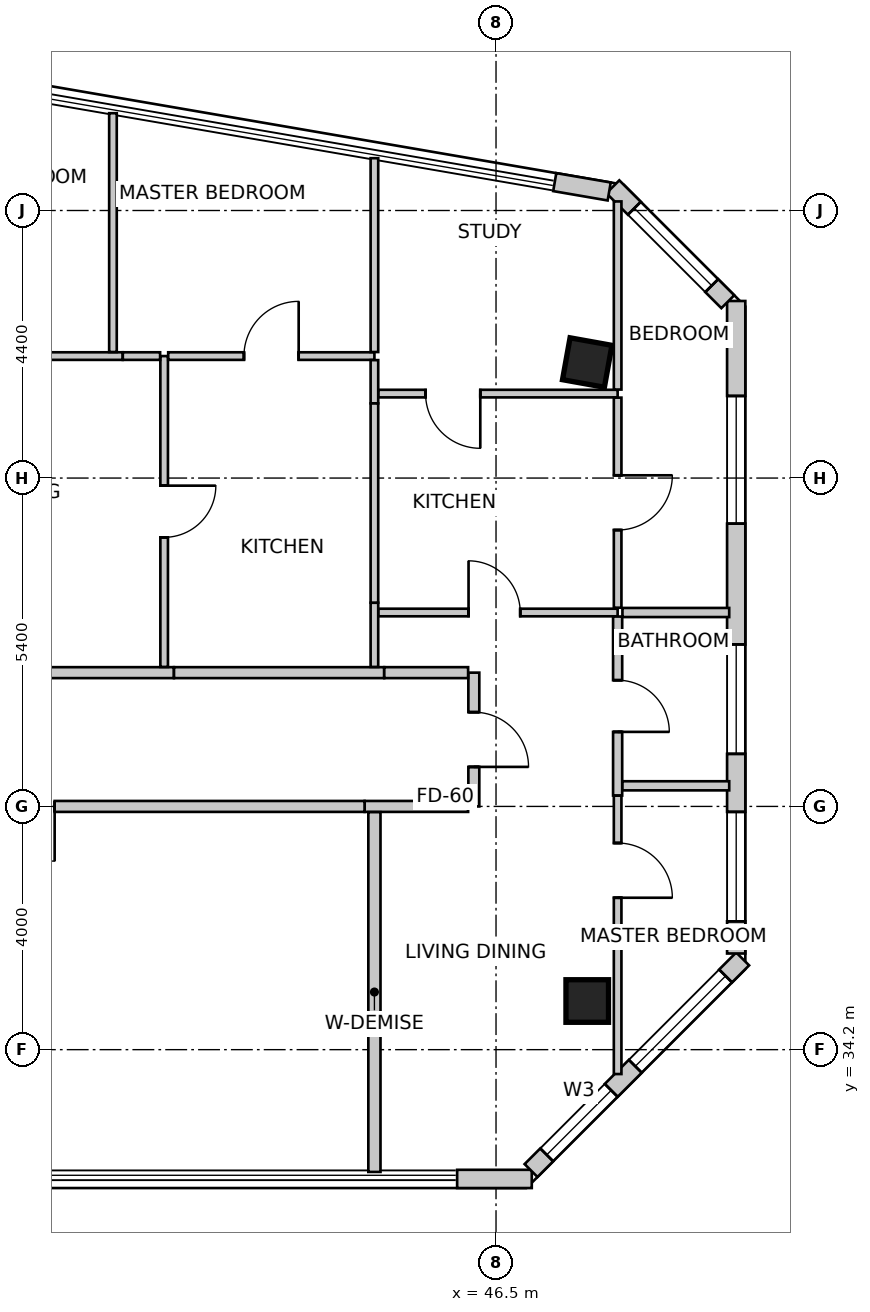
"""IFC4 building model, lengths in metres.
Left out: names, types, materials, properties, quantities, classifications, styles, units other than length and angle.
Written with IfcOpenShell. Run it as: python <this file> out.ifc"""

import sys

from ifc_helpers import new_model, si_unit, direction, frame, frame_2d, origin, origin_2d, place, context, subcontext, project, spatial, rectangle, extrude, source, transform, mapped, element, fill, save


model = new_model("IFC4")
c1 = context("Model", 3, precision=1e-05, world=origin(), true_north=direction((0.0, 1.0)))
c2 = subcontext(c1, "Body", "Model", "MODEL_VIEW")
j1 = project(units=[si_unit("LENGTHUNIT", "METRE"), si_unit("PLANEANGLEUNIT", "RADIAN")], contexts=[c1])
p1 = place(None, origin())
s1 = spatial("IfcSite", under=j1, at=p1, CompositionType="ELEMENT")
p2 = place(p1, origin())
s2 = spatial("IfcBuilding", under=s1, at=p2, CompositionType="ELEMENT")
p3 = place(p2, frame((0.0, 0.0, 197.4)))
s3 = spatial("IfcBuildingStorey", under=s2, at=p3, CompositionType="ELEMENT", Elevation=197.4)
m1 = source(origin(), c2, "Body", "SweptSolid", [
    extrude(rectangle(XDim=0.7, YDim=0.7, at=origin_2d()), origin(), (0.0, 0.0, 1.0), 3.5),
])
for number, where, z_axis, x_axis in (
    (1, (48.0, 45.5, 0.0), (0.0, 0.0, 1.0), (0.984, -0.177, 0.0)),
    (2, (48.0, 35.0, 0.0), (0.0, 0.0, 1.0), (1.0, 0.0, 0.0)),
):
    element("IfcColumn", number, at=place(p3, frame(where, z_axis=z_axis, x_axis=x_axis)), inside=s3, PredefinedType="COLUMN", context=c2, shape_type="MappedRepresentation", body=[
        mapped(m1, transform((0.0, 0.0, 0.0), scale=1.0)),
    ])
p4 = place(p3, frame((45.86, 32.074, 0.0), z_axis=(0.0, 0.0, 1.0), x_axis=(1.0, 0.0, 0.0)))
e3 = element("IfcWall", 3, at=p4, inside=s3, PredefinedType="SOLIDWALL", context=c2, shape_type="SweptSolid", body=[
    extrude(rectangle(XDim=1.228, YDim=0.3, at=frame_2d((0.614, 0.0))), origin(), (0.0, 0.0, 1.0), 3.25),
])
p5 = place(p3, frame((47.076, 32.212, 0.0), z_axis=(0.0, 0.0, 1.0), x_axis=(0.707106781187, 0.707106781187, 0.0)))
e4 = element("IfcWall", 4, at=p5, inside=s3, PredefinedType="SOLIDWALL", context=c2, shape_type="SweptSolid", body=[
    extrude(rectangle(XDim=4.922, YDim=0.3, at=frame_2d((2.461, 0.0))), origin(), (0.0, 0.0, 1.0), 3.25),
])
m2 = source(origin(), c2, "Body", "SweptSolid", [
    extrude(rectangle(XDim=1.5, YDim=1.8, at=frame_2d((0.75, 0.9))), frame((0.0, 0.16, 0.0), z_axis=(0.0, -1.0, 0.0), x_axis=(1.0, 0.0, 0.0)), (0.0, 0.0, 1.0), 0.32),
])
p6 = place(p5, frame((0.365, 0.0, 0.85)))
e5 = element("IfcOpeningElement", 5, at=p6, cuts=e4, PredefinedType="OPENING", context=c2, shape_type="MappedRepresentation", body=[
    mapped(m2, transform((0.0, 0.0, 0.0), scale=1.0)),
])
m3 = source(origin(), c2, "Body", "SweptSolid", [
    extrude(rectangle(XDim=2.1, YDim=2.0, at=frame_2d((1.05, 1.0))), frame((0.0, 0.16, 0.0), z_axis=(0.0, -1.0, 0.0), x_axis=(1.0, 0.0, 0.0)), (0.0, 0.0, 1.0), 0.32),
])
p7 = place(p5, frame((2.425, 0.0, 0.85)))
e6 = element("IfcOpeningElement", 6, at=p7, cuts=e4, PredefinedType="OPENING", context=c2, shape_type="MappedRepresentation", body=[
    mapped(m3, transform((0.0, 0.0, 0.0), scale=1.0)),
])
p8 = place(p3, frame((50.45, 35.781, 0.0), z_axis=(0.0, 0.0, 1.0), x_axis=(0.0, 1.0, 0.0)))
e7 = element("IfcWall", 7, at=p8, inside=s3, PredefinedType="SOLIDWALL", context=c2, shape_type="SweptSolid", body=[
    extrude(rectangle(XDim=10.731, YDim=0.3, at=frame_2d((5.365, 0.0))), origin(), (0.0, 0.0, 1.0), 3.25),
])
m4 = source(origin(), c2, "Body", "SweptSolid", [
    extrude(rectangle(XDim=1.8, YDim=2.1, at=frame_2d((0.9, 1.05))), frame((0.0, 0.16, 0.0), z_axis=(0.0, -1.0, 0.0), x_axis=(1.0, 0.0, 0.0)), (0.0, 0.0, 1.0), 0.32),
])
p9 = place(p8, frame((0.529, 0.0, 0.85)))
e8 = element("IfcOpeningElement", 8, at=p9, cuts=e7, PredefinedType="OPENING", context=c2, shape_type="MappedRepresentation", body=[
    mapped(m4, transform((0.0, 0.0, 0.0), scale=1.0)),
])
p10 = place(p8, frame((3.283, 0.0, 0.85)))
e9 = element("IfcOpeningElement", 9, at=p10, cuts=e7, PredefinedType="OPENING", context=c2, shape_type="MappedRepresentation", body=[
    mapped(m4, transform((0.0, 0.0, 0.0), scale=1.0)),
])
p11 = place(p8, frame((7.069, 0.0, 0.85)))
e10 = element("IfcOpeningElement", 10, at=p11, cuts=e7, PredefinedType="OPENING", context=c2, shape_type="MappedRepresentation", body=[
    mapped(m3, transform((0.0, 0.0, 0.0), scale=1.0)),
])
p12 = place(p3, frame((50.312, 46.5, 0.0), z_axis=(0.0, 0.0, 1.0), x_axis=(-0.707106781187, 0.707106781187, 0.0)))
e11 = element("IfcWall", 11, at=p12, inside=s3, PredefinedType="SOLIDWALL", context=c2, shape_type="SweptSolid", body=[
    extrude(rectangle(XDim=2.673, YDim=0.3, at=frame_2d((1.337, 0.0))), origin(), (0.0, 0.0, 1.0), 3.25),
])
p13 = place(p12, frame((0.374, 0.0, 0.85)))
e12 = element("IfcOpeningElement", 12, at=p13, cuts=e11, PredefinedType="OPENING", context=c2, shape_type="MappedRepresentation", body=[
    mapped(m4, transform((0.0, 0.0, 0.0), scale=1.0)),
])
p14 = place(p3, frame((48.361, 48.313, 0.0), z_axis=(0.0, 0.0, 1.0), x_axis=(-0.985560806516, 0.169321872949, 0.0)))
e13 = element("IfcWall", 13, at=p14, inside=s3, PredefinedType="SOLIDWALL", context=c2, shape_type="SweptSolid", body=[
    extrude(rectangle(XDim=0.908, YDim=0.3, at=frame_2d((0.454, 0.0))), origin(), (0.0, 0.0, 1.0), 3.25),
])
p15 = place(p3, frame((33.244, 40.4, 0.0), z_axis=(0.0, 0.0, 1.0), x_axis=(1.0, 0.0, 0.0)))
e14 = element("IfcWall", 14, at=p15, inside=s3, PredefinedType="PARTITIONING", context=c2, shape_type="SweptSolid", body=[
    extrude(rectangle(XDim=7.958, YDim=0.18, at=frame_2d((3.979, 0.0))), origin(), (0.0, 0.0, 1.0), 2.766),
])
m5 = source(origin(), c2, "Body", "SweptSolid", [
    extrude(rectangle(XDim=0.9, YDim=2.15, at=frame_2d((0.45, 1.075))), frame((0.0, 0.1, 0.0), z_axis=(0.0, -1.0, 0.0), x_axis=(1.0, 0.0, 0.0)), (0.0, 0.0, 1.0), 0.2),
])
p16 = place(p15, frame((2.807, 0.0, 0.0)))
e15 = element("IfcOpeningElement", 15, at=p16, cuts=e14, PredefinedType="OPENING", context=c2, shape_type="MappedRepresentation", body=[
    mapped(m5, transform((0.0, 0.0, 0.0), scale=1.0)),
])
p17 = place(p3, frame((41.204, 40.4, 0.0), z_axis=(0.0, 0.0, 1.0), x_axis=(1.0, 0.0, 0.0)))
e16 = element("IfcWall", 16, at=p17, inside=s3, PredefinedType="PARTITIONING", context=c2, shape_type="SweptSolid", body=[
    extrude(rectangle(XDim=3.456, YDim=0.18, at=frame_2d((1.728, 0.0))), origin(), (0.0, 0.0, 1.0), 2.779),
])
p18 = place(p3, frame((46.135, 40.4, 0.0), z_axis=(0.0, 0.0, 1.0), x_axis=(0.0, -1.0, 0.0)))
e17 = element("IfcWall", 17, at=p18, inside=s3, PredefinedType="PARTITIONING", context=c2, shape_type="SweptSolid", body=[
    extrude(rectangle(XDim=2.2, YDim=0.18, at=frame_2d((1.1, 0.0))), origin(), (0.0, 0.0, 1.0), 3.25),
])
p19 = place(p18, frame((0.65, 0.0, 0.0)))
e18 = element("IfcOpeningElement", 18, at=p19, cuts=e17, PredefinedType="OPENING", context=c2, shape_type="MappedRepresentation", body=[
    mapped(m5, transform((0.0, 0.0, 0.0), scale=1.0)),
])
p20 = place(p3, frame((44.662, 40.4, 0.0), z_axis=(0.0, 0.0, 1.0), x_axis=(1.0, 0.0, 0.0)))
e19 = element("IfcWall", 19, at=p20, inside=s3, PredefinedType="PARTITIONING", context=c2, shape_type="SweptSolid", body=[
    extrude(rectangle(XDim=1.379, YDim=0.18, at=frame_2d((0.689, 0.0))), origin(), (0.0, 0.0, 1.0), 3.25),
])
p21 = place(p3, frame((46.041, 38.2, 0.0), z_axis=(0.0, 0.0, 1.0), x_axis=(-1.0, 0.0, 0.0)))
e20 = element("IfcWall", 20, at=p21, inside=s3, PredefinedType="PARTITIONING", context=c2, shape_type="SweptSolid", body=[
    extrude(rectangle(XDim=1.701, YDim=0.18, at=frame_2d((0.851, 0.0))), origin(), (0.0, 0.0, 1.0), 2.919),
])
p22 = place(p3, frame((44.338, 38.2, 0.0), z_axis=(0.0, 0.0, 1.0), x_axis=(-1.0, 0.0, 0.0)))
e21 = element("IfcWall", 21, at=p22, inside=s3, PredefinedType="PARTITIONING", context=c2, shape_type="SweptSolid", body=[
    extrude(rectangle(XDim=11.094, YDim=0.18, at=frame_2d((5.547, 0.0))), origin(), (0.0, 0.0, 1.0), 2.766),
])
p23 = place(p22, frame((5.097, 0.0, 0.0)))
e22 = element("IfcOpeningElement", 22, at=p23, cuts=e21, PredefinedType="OPENING", context=c2, shape_type="MappedRepresentation", body=[
    mapped(m5, transform((0.0, 0.0, 0.0), scale=1.0)),
])
p24 = place(p3, frame((41.042, 45.606, 0.0), z_axis=(0.0, 0.0, 1.0), x_axis=(0.0, -1.0, 0.0)))
e23 = element("IfcWall", 23, at=p24, inside=s3, PredefinedType="PARTITIONING", context=c2, shape_type="SweptSolid", body=[
    extrude(rectangle(XDim=5.112, YDim=0.125, at=frame_2d((2.556, 0.0))), origin(), (0.0, 0.0, 1.0), 2.779),
])
m6 = source(origin(), c2, "Body", "SweptSolid", [
    extrude(rectangle(XDim=0.85, YDim=2.15, at=frame_2d((0.425, 1.075))), frame((0.0, 0.073, 0.0), z_axis=(0.0, -1.0, 0.0), x_axis=(1.0, 0.0, 0.0)), (0.0, 0.0, 1.0), 0.145),
])
p25 = place(p24, frame((2.131, 0.0, 0.0)))
e24 = element("IfcOpeningElement", 24, at=p25, cuts=e23, PredefinedType="OPENING", context=c2, shape_type="MappedRepresentation", body=[
    mapped(m6, transform((0.0, 0.0, 0.0), scale=1.0)),
])
p26 = place(p3, frame((36.062, 45.606, 0.0), z_axis=(0.0, 0.0, 1.0), x_axis=(1.0, 0.0, 0.0)))
e25 = element("IfcWall", 25, at=p26, inside=s3, PredefinedType="PARTITIONING", context=c2, shape_type="SweptSolid", body=[
    extrude(rectangle(XDim=4.298, YDim=0.125, at=frame_2d((2.149, 0.0))), origin(), (0.0, 0.0, 1.0), 2.766),
])
m7 = source(origin(), c2, "Body", "SweptSolid", [
    extrude(rectangle(XDim=0.9, YDim=2.15, at=frame_2d((0.45, 1.075))), frame((0.0, 0.073, 0.0), z_axis=(0.0, -1.0, 0.0), x_axis=(1.0, 0.0, 0.0)), (0.0, 0.0, 1.0), 0.145),
])
p27 = place(p26, frame((0.403, 0.0, 0.0)))
e26 = element("IfcOpeningElement", 26, at=p27, cuts=e25, PredefinedType="OPENING", context=c2, shape_type="MappedRepresentation", body=[
    mapped(m7, transform((0.0, 0.0, 0.0), scale=1.0)),
])
p28 = place(p3, frame((40.362, 45.606, 0.0), z_axis=(0.0, 0.0, 1.0), x_axis=(1.0, 0.0, 0.0)))
e27 = element("IfcWall", 27, at=p28, inside=s3, PredefinedType="PARTITIONING", context=c2, shape_type="SweptSolid", body=[
    extrude(rectangle(XDim=0.614, YDim=0.125, at=frame_2d((0.307, 0.0))), origin(), (0.0, 0.0, 1.0), 3.25),
])
p29 = place(p3, frame((41.108, 45.606, 0.0), z_axis=(0.0, 0.0, 1.0), x_axis=(1.0, 0.0, 0.0)))
e28 = element("IfcWall", 28, at=p29, inside=s3, PredefinedType="PARTITIONING", context=c2, shape_type="SweptSolid", body=[
    extrude(rectangle(XDim=3.392, YDim=0.125, at=frame_2d((1.696, 0.0))), origin(), (0.0, 0.0, 1.0), 3.25),
])
p30 = place(p29, frame((1.246, 0.0, 0.0)))
e29 = element("IfcOpeningElement", 29, at=p30, cuts=e28, PredefinedType="OPENING", context=c2, shape_type="MappedRepresentation", body=[
    mapped(m7, transform((0.0, 0.0, 0.0), scale=1.0)),
])
p31 = place(p3, frame((44.5, 45.54, 0.0), z_axis=(0.0, 0.0, 1.0), x_axis=(0.0, -1.0, 0.0)))
e30 = element("IfcWall", 30, at=p31, inside=s3, PredefinedType="PARTITIONING", context=c2, shape_type="SweptSolid", body=[
    extrude(rectangle(XDim=0.71, YDim=0.125, at=frame_2d((0.355, 0.0))), origin(), (0.0, 0.0, 1.0), 3.25),
])
p32 = place(p3, frame((44.5, 41.549, 0.0), z_axis=(0.0, 0.0, 1.0), x_axis=(0.0, -1.0, 0.0)))
e31 = element("IfcWall", 31, at=p32, inside=s3, PredefinedType="PARTITIONING", context=c2, shape_type="SweptSolid", body=[
    extrude(rectangle(XDim=1.055, YDim=0.125, at=frame_2d((0.528, 0.0))), origin(), (0.0, 0.0, 1.0), 2.779),
])
p33 = place(p3, frame((44.5, 44.827, 0.0), z_axis=(0.0, 0.0, 1.0), x_axis=(0.0, -1.0, 0.0)))
e32 = element("IfcWall", 32, at=p33, inside=s3, PredefinedType="PARTITIONING", context=c2, shape_type="SweptSolid", body=[
    extrude(rectangle(XDim=3.276, YDim=0.125, at=frame_2d((1.638, 0.0))), origin(), (0.0, 0.0, 1.0), 2.779),
])
p34 = place(p3, frame((40.2, 49.6, 0.0), z_axis=(0.0, 0.0, 1.0), x_axis=(0.0, -1.0, 0.0)))
e33 = element("IfcWall", 33, at=p34, inside=s3, PredefinedType="PARTITIONING", context=c2, shape_type="SweptSolid", body=[
    extrude(rectangle(XDim=3.927, YDim=0.125, at=frame_2d((1.964, 0.0))), origin(), (0.0, 0.0, 1.0), 2.542),
])
p35 = place(p3, frame((44.5, 48.86, 0.0), z_axis=(0.0, 0.0, 1.0), x_axis=(0.0, -1.0, 0.0)))
e34 = element("IfcWall", 34, at=p35, inside=s3, PredefinedType="PARTITIONING", context=c2, shape_type="SweptSolid", body=[
    extrude(rectangle(XDim=3.188, YDim=0.125, at=frame_2d((1.594, 0.0))), origin(), (0.0, 0.0, 1.0), 2.542),
])
p36 = place(p3, frame((48.5, 44.989, 0.0), z_axis=(0.0, 0.0, 1.0), x_axis=(-1.0, 0.0, 0.0)))
e35 = element("IfcWall", 35, at=p36, inside=s3, PredefinedType="PARTITIONING", context=c2, shape_type="SweptSolid", body=[
    extrude(rectangle(XDim=3.934, YDim=0.125, at=frame_2d((1.967, 0.0))), origin(), (0.0, 0.0, 1.0), 2.766),
])
p37 = place(p36, frame((2.259, 0.0, 0.0)))
e36 = element("IfcOpeningElement", 36, at=p37, cuts=e35, PredefinedType="OPENING", context=c2, shape_type="MappedRepresentation", body=[
    mapped(m7, transform((0.0, 0.0, 0.0), scale=1.0)),
])
p38 = place(p3, frame((48.5, 48.149, 0.0), z_axis=(0.0, 0.0, 1.0), x_axis=(0.0, -1.0, 0.0)))
e37 = element("IfcWall", 37, at=p38, inside=s3, PredefinedType="PARTITIONING", context=c2, shape_type="SweptSolid", body=[
    extrude(rectangle(XDim=3.094, YDim=0.125, at=frame_2d((1.547, 0.0))), origin(), (0.0, 0.0, 1.0), 3.25),
])
p39 = place(p3, frame((44.566, 41.389, 0.0), z_axis=(0.0, 0.0, 1.0), x_axis=(1.0, 0.0, 0.0)))
e38 = element("IfcWall", 38, at=p39, inside=s3, PredefinedType="PARTITIONING", context=c2, shape_type="SweptSolid", body=[
    extrude(rectangle(XDim=3.934, YDim=0.125, at=frame_2d((1.967, 0.0))), origin(), (0.0, 0.0, 1.0), 2.766),
])
p40 = place(p39, frame((1.482, 0.0, 0.0)))
e39 = element("IfcOpeningElement", 39, at=p40, cuts=e38, PredefinedType="OPENING", context=c2, shape_type="MappedRepresentation", body=[
    mapped(m6, transform((0.0, 0.0, 0.0), scale=1.0)),
])
p41 = place(p3, frame((48.5, 41.323, 0.0), z_axis=(0.0, 0.0, 1.0), x_axis=(0.0, -1.0, 0.0)))
e40 = element("IfcWall", 40, at=p41, inside=s3, PredefinedType="PARTITIONING", context=c2, shape_type="SweptSolid", body=[
    extrude(rectangle(XDim=2.944, YDim=0.15, at=frame_2d((1.472, 0.0))), origin(), (0.0, 0.0, 1.0), 3.25),
])
m8 = source(origin(), c2, "Body", "SweptSolid", [
    extrude(rectangle(XDim=0.85, YDim=2.15, at=frame_2d((0.425, 1.075))), frame((0.0, 0.085, 0.0), z_axis=(0.0, -1.0, 0.0), x_axis=(1.0, 0.0, 0.0)), (0.0, 0.0, 1.0), 0.17),
])
p42 = place(p41, frame((1.047, 0.0, 0.0)))
e41 = element("IfcOpeningElement", 41, at=p42, cuts=e40, PredefinedType="OPENING", context=c2, shape_type="MappedRepresentation", body=[
    mapped(m8, transform((0.0, 0.0, 0.0), scale=1.0)),
])
p43 = place(p3, frame((48.5, 38.377, 0.0), z_axis=(0.0, 0.0, 1.0), x_axis=(0.0, -1.0, 0.0)))
e42 = element("IfcWall", 42, at=p43, inside=s3, PredefinedType="PARTITIONING", context=c2, shape_type="SweptSolid", body=[
    extrude(rectangle(XDim=4.578, YDim=0.125, at=frame_2d((2.289, 0.0))), origin(), (0.0, 0.0, 1.0), 3.25),
])
p44 = place(p43, frame((0.779, 0.0, 0.0)))
e43 = element("IfcOpeningElement", 43, at=p44, cuts=e42, PredefinedType="OPENING", context=c2, shape_type="MappedRepresentation", body=[
    mapped(m7, transform((0.0, 0.0, 0.0), scale=1.0)),
])
p45 = place(p3, frame((44.5, 32.189, 0.0), z_axis=(0.0, 0.0, 1.0), x_axis=(0.0, 1.0, 0.0)))
e44 = element("IfcWall", 44, at=p45, inside=s3, PredefinedType="PARTITIONING", context=c2, shape_type="SweptSolid", body=[
    extrude(rectangle(XDim=5.917, YDim=0.2, at=frame_2d((2.958, 0.0))), origin(), (0.0, 0.0, 1.0), 2.542),
])
p46 = place(p3, frame((48.5, 44.923, 0.0), z_axis=(0.0, 0.0, 1.0), x_axis=(0.0, -1.0, 0.0)))
e45 = element("IfcWall", 45, at=p46, inside=s3, PredefinedType="PARTITIONING", context=c2, shape_type="SweptSolid", body=[
    extrude(rectangle(XDim=3.455, YDim=0.125, at=frame_2d((1.727, 0.0))), origin(), (0.0, 0.0, 1.0), 3.25),
])
p47 = place(p46, frame((1.277, 0.0, 0.0)))
e46 = element("IfcOpeningElement", 46, at=p47, cuts=e45, PredefinedType="OPENING", context=c2, shape_type="MappedRepresentation", body=[
    mapped(m7, transform((0.0, 0.0, 0.0), scale=1.0)),
])
for number, where, z_axis, x_axis in (
    (47, (48.579, 41.389, 0.0), (0.0, 0.0, 1.0), (1.0, 0.0, 0.0)),
    (48, (50.335, 38.539, 0.0), (0.0, 0.0, 1.0), (-1.0, 0.0, 0.0)),
):
    element("IfcWall", number, at=place(p3, frame(where, z_axis=z_axis, x_axis=x_axis)), inside=s3, PredefinedType="PARTITIONING", context=c2, shape_type="SweptSolid", body=[
        extrude(rectangle(XDim=1.756, YDim=0.15, at=frame_2d((0.878, 0.0))), origin(), (0.0, 0.0, 1.0), 3.25),
    ])
m9 = source(origin(), c2, "Body", "SweptSolid", [
    extrude(rectangle(XDim=1.5, YDim=1.8, at=frame_2d((0.75, 0.9))), frame((0.0, -0.015, 0.0), z_axis=(0.0, -1.0, 0.0), x_axis=(1.0, 0.0, 0.0)), (0.0, 0.0, 1.0), 0.06),
])
p48 = place(p6, origin())
e49 = element("IfcWindow", 49, at=p48, inside=s3, PartitioningType="SINGLE_PANEL", PredefinedType="WINDOW", context=c2, shape_type="MappedRepresentation", body=[
    mapped(m9, transform((0.0, 0.0, 0.0), scale=1.0)),
])
fill(e5, e49)
m10 = source(origin(), c2, "Body", "SweptSolid", [
    extrude(rectangle(XDim=2.1, YDim=2.0, at=frame_2d((1.05, 1.0))), frame((0.0, -0.015, 0.0), z_axis=(0.0, -1.0, 0.0), x_axis=(1.0, 0.0, 0.0)), (0.0, 0.0, 1.0), 0.06),
])
p49 = place(p7, origin())
e50 = element("IfcWindow", 50, at=p49, inside=s3, PartitioningType="SINGLE_PANEL", PredefinedType="WINDOW", context=c2, shape_type="MappedRepresentation", body=[
    mapped(m10, transform((0.0, 0.0, 0.0), scale=1.0)),
])
fill(e6, e50)
m11 = source(origin(), c2, "Body", "SweptSolid", [
    extrude(rectangle(XDim=1.8, YDim=2.1, at=frame_2d((0.9, 1.05))), frame((0.0, -0.015, 0.0), z_axis=(0.0, -1.0, 0.0), x_axis=(1.0, 0.0, 0.0)), (0.0, 0.0, 1.0), 0.06),
])
p50 = place(p9, origin())
e51 = element("IfcWindow", 51, at=p50, inside=s3, PartitioningType="SINGLE_PANEL", PredefinedType="WINDOW", context=c2, shape_type="MappedRepresentation", body=[
    mapped(m11, transform((0.0, 0.0, 0.0), scale=1.0)),
])
fill(e8, e51)
p51 = place(p10, origin())
e52 = element("IfcWindow", 52, at=p51, inside=s3, PartitioningType="SINGLE_PANEL", PredefinedType="WINDOW", context=c2, shape_type="MappedRepresentation", body=[
    mapped(m11, transform((0.0, 0.0, 0.0), scale=1.0)),
])
fill(e9, e52)
p52 = place(p11, origin())
e53 = element("IfcWindow", 53, at=p52, inside=s3, PartitioningType="SINGLE_PANEL", PredefinedType="WINDOW", context=c2, shape_type="MappedRepresentation", body=[
    mapped(m10, transform((0.0, 0.0, 0.0), scale=1.0)),
])
fill(e10, e53)
p53 = place(p13, origin())
e54 = element("IfcWindow", 54, at=p53, inside=s3, PartitioningType="SINGLE_PANEL", PredefinedType="WINDOW", context=c2, shape_type="MappedRepresentation", body=[
    mapped(m11, transform((0.0, 0.0, 0.0), scale=1.0)),
])
fill(e12, e54)
m12 = source(origin(), c2, "Body", "SweptSolid", [
    extrude(rectangle(XDim=0.85, YDim=2.15, at=frame_2d((0.425, 1.075))), frame((0.0, 0.025, 0.0), z_axis=(0.0, -1.0, 0.0), x_axis=(1.0, 0.0, 0.0)), (0.0, 0.0, 1.0), 0.05),
])
p54 = place(p25, origin())
e55 = element("IfcDoor", 55, at=p54, inside=s3, OperationType="SINGLE_SWING_LEFT", PredefinedType="DOOR", context=c2, shape_type="MappedRepresentation", body=[
    mapped(m12, transform((0.0, 0.0, 0.0), scale=1.0)),
])
fill(e24, e55)
m13 = source(origin(), c2, "Body", "SweptSolid", [
    extrude(rectangle(XDim=0.9, YDim=2.15, at=frame_2d((0.45, 1.075))), frame((0.0, 0.025, 0.0), z_axis=(0.0, -1.0, 0.0), x_axis=(1.0, 0.0, 0.0)), (0.0, 0.0, 1.0), 0.05),
])
p55 = place(p30, origin())
e56 = element("IfcDoor", 56, at=p55, inside=s3, OperationType="SINGLE_SWING_RIGHT", PredefinedType="DOOR", context=c2, shape_type="MappedRepresentation", body=[
    mapped(m13, transform((0.0, 0.0, 0.0), scale=1.0)),
])
fill(e29, e56)
p56 = place(p37, origin())
e57 = element("IfcDoor", 57, at=p56, inside=s3, OperationType="SINGLE_SWING_LEFT", PredefinedType="DOOR", context=c2, shape_type="MappedRepresentation", body=[
    mapped(m13, transform((0.0, 0.0, 0.0), scale=1.0)),
])
fill(e36, e57)
m14 = source(origin(), c2, "Body", "SweptSolid", [
    extrude(rectangle(XDim=0.9, YDim=2.15, at=frame_2d((0.45, 1.075))), frame((0.0, 0.025, 0.0), z_axis=(0.0, -1.0, 0.0), x_axis=(1.0, 0.0, 0.0)), (0.0, 0.0, 1.0), 0.05),
])
p57 = place(p19, origin())
e58 = element("IfcDoor", 58, at=p57, inside=s3, OperationType="SINGLE_SWING_RIGHT", PredefinedType="DOOR", context=c2, shape_type="MappedRepresentation", body=[
    mapped(m14, transform((0.0, 0.0, 0.0), scale=1.0)),
])
fill(e18, e58)
p58 = place(p40, origin())
e59 = element("IfcDoor", 59, at=p58, inside=s3, OperationType="SINGLE_SWING_LEFT", PredefinedType="DOOR", context=c2, shape_type="MappedRepresentation", body=[
    mapped(m12, transform((0.0, 0.0, 0.0), scale=1.0)),
])
fill(e39, e59)
p59 = place(p42, origin())
e60 = element("IfcDoor", 60, at=p59, inside=s3, OperationType="SINGLE_SWING_RIGHT", PredefinedType="DOOR", context=c2, shape_type="MappedRepresentation", body=[
    mapped(m12, transform((0.0, 0.0, 0.0), scale=1.0)),
])
fill(e41, e60)
p60 = place(p47, origin())
e61 = element("IfcDoor", 61, at=p60, inside=s3, OperationType="SINGLE_SWING_LEFT", PredefinedType="DOOR", context=c2, shape_type="MappedRepresentation", body=[
    mapped(m13, transform((0.0, 0.0, 0.0), scale=1.0)),
])
fill(e46, e61)
p61 = place(p44, origin())
e62 = element("IfcDoor", 62, at=p61, inside=s3, OperationType="SINGLE_SWING_RIGHT", PredefinedType="DOOR", context=c2, shape_type="MappedRepresentation", body=[
    mapped(m13, transform((0.0, 0.0, 0.0), scale=1.0)),
])
fill(e43, e62)
p62 = place(p23, origin())
e63 = element("IfcDoor", 63, at=p62, inside=s3, OperationType="SINGLE_SWING_LEFT", PredefinedType="DOOR", context=c2, shape_type="MappedRepresentation", body=[
    mapped(m13, transform((0.0, 0.0, 0.0), scale=1.0)),
])
fill(e22, e63)
save(model, sys.argv[1])
